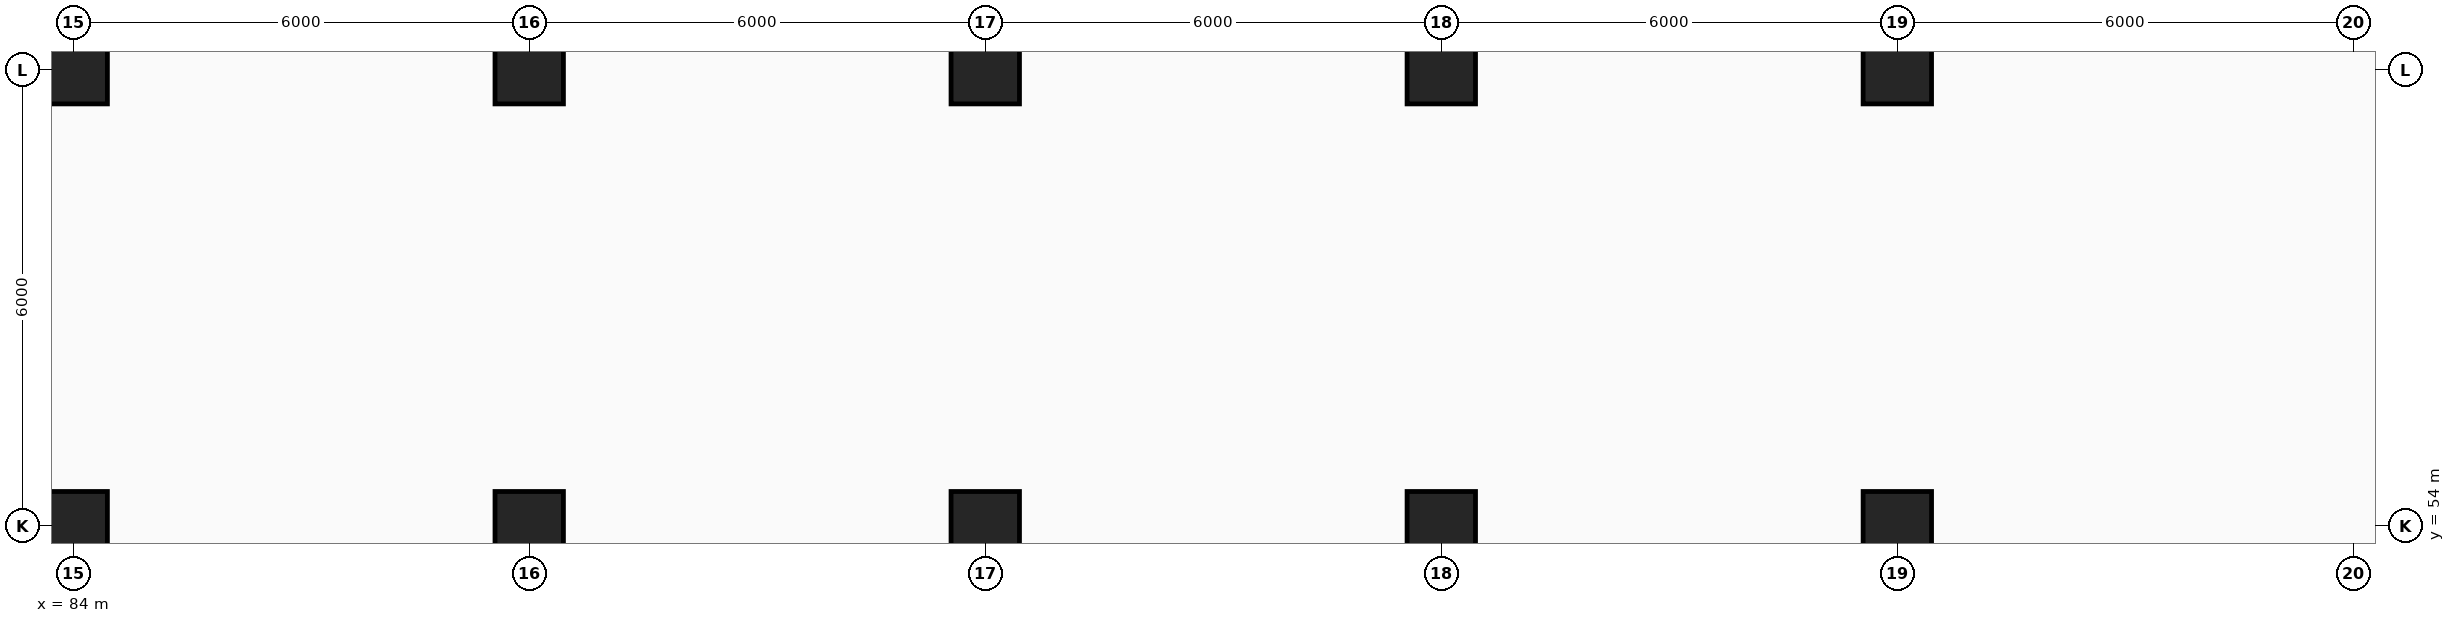
"""IFC4 building model, lengths in metres.
Left out: names, types, materials, properties, quantities, classifications, styles, units other than length and angle.
Written with IfcOpenShell. Run it as: python <this file> out.ifc"""

import sys

from ifc_helpers import new_model, si_unit, direction, frame, origin, origin_2d, place, context, subcontext, project, spatial, rectangle, extrude, element, save


model = new_model("IFC4")
c1 = context("Model", 3, precision=1e-05, world=origin(), true_north=direction((0.0, 1.0)))
c2 = subcontext(c1, "Body", "Model", "MODEL_VIEW")
j1 = project(units=[si_unit("LENGTHUNIT", "METRE"), si_unit("PLANEANGLEUNIT", "RADIAN")], contexts=[c1])
p1 = place(None, origin())
s1 = spatial("IfcSite", under=j1, at=p1, CompositionType="ELEMENT")
p2 = place(p1, origin())
s2 = spatial("IfcBuilding", under=s1, at=p2, CompositionType="ELEMENT")
p3 = place(p2, frame((0.0, 0.0, -4.8)))
s3 = spatial("IfcBuildingStorey", under=s2, at=p3, CompositionType="ELEMENT", Elevation=-4.8)
for number, where, z_axis, x_axis in (
    (1, (84.0, 54.0, 0.0), (0.0, 0.0, 1.0), (1.0, 0.0, 0.0)),
    (2, (84.0, 60.0, 0.0), (0.0, 0.0, 1.0), (1.0, 0.0, 0.0)),
    (3, (90.0, 54.0, 0.0), (0.0, 0.0, 1.0), (1.0, 0.0, 0.0)),
    (4, (90.0, 60.0, 0.0), (0.0, 0.0, 1.0), (1.0, 0.0, 0.0)),
    (5, (96.0, 54.0, 0.0), (0.0, 0.0, 1.0), (1.0, 0.0, 0.0)),
    (6, (96.0, 60.0, 0.0), (0.0, 0.0, 1.0), (1.0, 0.0, 0.0)),
    (7, (102.0, 54.0, 0.0), (0.0, 0.0, 1.0), (1.0, 0.0, 0.0)),
    (8, (102.0, 60.0, 0.0), (0.0, 0.0, 1.0), (1.0, 0.0, 0.0)),
    (9, (108.0, 54.0, 0.0), (0.0, 0.0, 1.0), (1.0, 0.0, 0.0)),
    (10, (108.0, 60.0, 0.0), (0.0, 0.0, 1.0), (1.0, 0.0, 0.0)),
):
    element("IfcColumn", number, at=place(p3, frame(where, z_axis=z_axis, x_axis=x_axis)), inside=s3, PredefinedType="COLUMN", context=c2, shape_type="SweptSolid", body=[
        extrude(rectangle(XDim=0.9, YDim=0.9, at=origin_2d()), origin(), (0.0, 0.0, 1.0), 4.8),
    ])
save(model, sys.argv[1])
